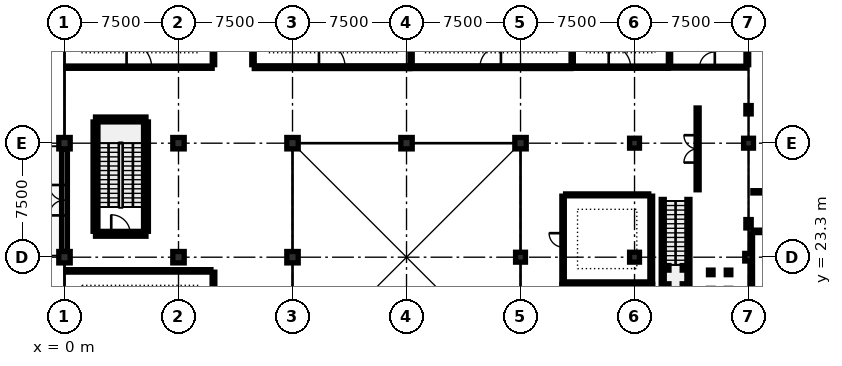
"""IFC4 building model, lengths in metres.
Left out: names, types, materials, properties, quantities, classifications, styles, units other than length and angle.
Written with IfcOpenShell. Run it as: python <this file> out.ifc"""

import sys

from ifc_helpers import new_model, si_unit, direction, frame, frame_2d, origin, origin_2d, place, context, subcontext, project, spatial, rectangle, i_section, extrude, element, fill, save


model = new_model("IFC4")
c1 = context("Model", 3, precision=1e-05, world=origin(), true_north=direction((0.0, 1.0)))
c2 = subcontext(c1, "Body", "Model", "MODEL_VIEW")
j1 = project(units=[si_unit("LENGTHUNIT", "METRE"), si_unit("PLANEANGLEUNIT", "RADIAN")], contexts=[c1])
p1 = place(None, origin())
s1 = spatial("IfcSite", under=j1, at=p1, CompositionType="ELEMENT")
p2 = place(p1, origin())
s2 = spatial("IfcBuilding", under=s1, at=p2, CompositionType="ELEMENT")
p3 = place(p2, origin())
s3 = spatial("IfcBuildingStorey", under=s2, at=p3, CompositionType="ELEMENT", Elevation=0.0)
for number, where, z_axis, x_axis in (
    (1, (0.0, 23.3, 0.0), (0.0, 0.0, 1.0), (1.0, 0.0, 0.0)),
    (2, (0.0, 30.8, 0.0), (0.0, 0.0, 1.0), (1.0, 0.0, 0.0)),
    (3, (7.5, 23.3, 0.0), (0.0, 0.0, 1.0), (1.0, 0.0, 0.0)),
    (4, (7.5, 30.8, 0.0), (0.0, 0.0, 1.0), (1.0, 0.0, 0.0)),
    (5, (15.0, 23.3, 0.0), (0.0, 0.0, 1.0), (1.0, 0.0, 0.0)),
    (6, (15.0, 30.8, 0.0), (0.0, 0.0, 1.0), (1.0, 0.0, 0.0)),
    (7, (22.5, 30.8, 0.0), (0.0, 0.0, 1.0), (1.0, 0.0, 0.0)),
):
    element("IfcColumn", number, at=place(p3, frame(where, z_axis=z_axis, x_axis=x_axis)), inside=s3, PredefinedType="COLUMN", context=c2, shape_type="SweptSolid", body=[
        extrude(rectangle(XDim=0.75, YDim=0.75, at=origin_2d()), origin(), (0.0, 0.0, 1.0), 4.7),
    ])
p4 = place(p3, frame((30.0, 23.3, 0.0), z_axis=(0.0, 0.0, 1.0), x_axis=(1.0, 0.0, 0.0)))
e8 = element("IfcColumn", 8, at=p4, inside=s3, PredefinedType="COLUMN", context=c2, shape_type="SweptSolid", body=[
    extrude(rectangle(XDim=0.65, YDim=0.65, at=origin_2d()), origin(), (0.0, 0.0, 1.0), 4.7),
])
p5 = place(p3, frame((30.0, 30.8, 0.0), z_axis=(0.0, 0.0, 1.0), x_axis=(1.0, 0.0, 0.0)))
e9 = element("IfcColumn", 9, at=p5, inside=s3, PredefinedType="COLUMN", context=c2, shape_type="SweptSolid", body=[
    extrude(rectangle(XDim=0.75, YDim=0.75, at=origin_2d()), origin(), (0.0, 0.0, 1.0), 4.7),
])
for number, where, z_axis, x_axis in (
    (10, (37.5, 23.3, 0.0), (0.0, 0.0, 1.0), (1.0, 0.0, 0.0)),
    (11, (37.5, 30.8, 0.0), (0.0, 0.0, 1.0), (1.0, 0.0, 0.0)),
):
    element("IfcColumn", number, at=place(p3, frame(where, z_axis=z_axis, x_axis=x_axis)), inside=s3, PredefinedType="COLUMN", context=c2, shape_type="SweptSolid", body=[
        extrude(rectangle(XDim=0.65, YDim=0.65, at=origin_2d()), origin(), (0.0, 0.0, 1.0), 4.7),
    ])
p6 = place(p3, frame((45.0, 23.3, 0.0), z_axis=(0.0, 0.0, 1.0), x_axis=(1.0, 0.0, 0.0)))
e12 = element("IfcColumn", 12, at=p6, inside=s3, PredefinedType="COLUMN", context=c2, shape_type="SweptSolid", body=[
    extrude(rectangle(XDim=0.5, YDim=0.5, at=origin_2d()), origin(), (0.0, 0.0, 1.0), 6.138),
])
p7 = place(p3, frame((45.0, 30.8, 0.0), z_axis=(0.0, 0.0, 1.0), x_axis=(1.0, 0.0, 0.0)))
e13 = element("IfcColumn", 13, at=p7, inside=s3, PredefinedType="COLUMN", context=c2, shape_type="SweptSolid", body=[
    extrude(rectangle(XDim=0.65, YDim=0.65, at=origin_2d()), origin(), (0.0, 0.0, 1.0), 4.7),
])
for number, where, z_axis, x_axis in (
    (14, (45.0, 25.5, 0.0), (0.0, 0.0, 1.0), (1.0, 0.0, 0.0)),
    (15, (45.0, 33.0, 0.0), (0.0, 0.0, 1.0), (1.0, 0.0, 0.0)),
):
    element("IfcColumn", number, at=place(p3, frame(where, z_axis=z_axis, x_axis=x_axis)), inside=s3, PredefinedType="PILASTER", context=c2, shape_type="SweptSolid", body=[
        extrude(rectangle(XDim=0.35, YDim=0.55, at=origin_2d()), origin(), (0.0, 0.0, 1.0), 4.7),
    ])
p8 = place(p3, frame((0.0, 23.675, 0.0), z_axis=(0.0, 0.0, 1.0), x_axis=(0.0, 1.0, 0.0)))
e16 = element("IfcWall", 16, at=p8, inside=s3, PredefinedType="SOLIDWALL", context=c2, shape_type="SweptSolid", body=[
    extrude(rectangle(XDim=6.75, YDim=0.38, at=frame_2d((3.375, 0.0))), origin(), (0.0, 0.0, 1.0), 4.035),
])
p9 = place(p8, frame((2.375, 0.0, 0.0)))
e17 = element("IfcOpeningElement", 17, at=p9, cuts=e16, PredefinedType="OPENING", context=c2, shape_type="SweptSolid", body=[
    extrude(rectangle(XDim=2.0, YDim=2.35, at=frame_2d((1.0, 1.175))), frame((0.0, 0.202, 0.0), z_axis=(0.0, -1.0, 0.0), x_axis=(1.0, 0.0, 0.0)), (0.0, 0.0, 1.0), 0.404),
])
p10 = place(p3, frame((5.36, 25.005, 0.0), z_axis=(0.0, 0.0, 1.0), x_axis=(0.0, 1.0, 0.0)))
e18 = element("IfcWall", 18, at=p10, inside=s3, PredefinedType="SHEAR", context=c2, shape_type="SweptSolid", body=[
    extrude(rectangle(XDim=7.19, YDim=0.32, at=frame_2d((3.595, 0.0))), origin(), (0.0, 0.0, 1.0), 4.7),
])
p11 = place(p3, frame((5.36, 32.36, 0.0), z_axis=(0.0, 0.0, 1.0), x_axis=(-1.0, 0.0, 0.0)))
e19 = element("IfcWall", 19, at=p11, inside=s3, PredefinedType="SHEAR", context=c2, shape_type="SweptSolid", body=[
    extrude(rectangle(XDim=3.32, YDim=0.32, at=frame_2d((1.66, 0.0))), origin(), (0.0, 0.0, 1.0), 4.7),
])
p12 = place(p3, frame((2.04, 32.195, 0.0), z_axis=(0.0, 0.0, 1.0), x_axis=(0.0, -1.0, 0.0)))
e20 = element("IfcWall", 20, at=p12, inside=s3, PredefinedType="SHEAR", context=c2, shape_type="SweptSolid", body=[
    extrude(rectangle(XDim=7.19, YDim=0.32, at=frame_2d((3.595, 0.0))), origin(), (0.0, 0.0, 1.0), 4.7),
])
p13 = place(p3, frame((2.04, 24.84, 0.0), z_axis=(0.0, 0.0, 1.0), x_axis=(1.0, 0.0, 0.0)))
e21 = element("IfcWall", 21, at=p13, inside=s3, PredefinedType="SHEAR", context=c2, shape_type="SweptSolid", body=[
    extrude(rectangle(XDim=3.32, YDim=0.32, at=frame_2d((1.66, 0.0))), origin(), (0.0, 0.0, 1.0), 4.7),
])
p14 = place(p13, frame((1.035, 0.0, 0.0)))
e22 = element("IfcOpeningElement", 22, at=p14, cuts=e21, PredefinedType="OPENING", context=c2, shape_type="SweptSolid", body=[
    extrude(rectangle(XDim=1.25, YDim=2.2, at=frame_2d((0.625, 1.1))), frame((0.0, 0.172, 0.0), z_axis=(0.0, -1.0, 0.0), x_axis=(1.0, 0.0, 0.0)), (0.0, 0.0, 1.0), 0.344),
])
for number, where, z_axis, x_axis in (
    (23, (39.355, 16.9, 0.0), (0.0, 0.0, 1.0), (0.0, 1.0, 0.0)),
    (24, (41.045, 16.9, 0.0), (0.0, 0.0, 1.0), (0.0, 1.0, 0.0)),
):
    element("IfcWall", number, at=place(p3, frame(where, z_axis=z_axis, x_axis=x_axis)), inside=s3, PredefinedType="PARTITIONING", context=c2, shape_type="SweptSolid", body=[
        extrude(rectangle(XDim=10.2, YDim=0.2, at=frame_2d((5.1, 0.0))), origin(), (0.0, 0.0, 1.0), 2.3),
    ])
for number, where, z_axis, x_axis in (
    (25, (39.615, 21.4, 0.0), (0.0, 0.0, 1.0), (1.0, 0.0, 0.0)),
    (26, (40.785, 21.4, 0.0), (0.0, 0.0, 1.0), (1.0, 0.0, 0.0)),
    (27, (40.785, 22.6, 0.0), (0.0, 0.0, 1.0), (1.0, 0.0, 0.0)),
    (28, (39.615, 22.6, 0.0), (0.0, 0.0, 1.0), (1.0, 0.0, 0.0)),
):
    element("IfcColumn", number, at=place(p3, frame(where, z_axis=z_axis, x_axis=x_axis)), inside=s3, PredefinedType="COLUMN", context=c2, shape_type="SweptSolid", body=[
        extrude(i_section(OverallWidth=0.3, OverallDepth=0.3, WebThickness=0.011, FlangeThickness=0.019, FilletRadius=0.027, at=origin_2d()), origin(), (0.0, 0.0, 1.0), 2.3),
    ])
for number, where, z_axis, x_axis in (
    (29, (43.685, 22.3, 0.0), (0.0, 0.0, 1.0), (1.0, 0.0, 0.0)),
    (30, (42.515, 22.3, 0.0), (0.0, 0.0, 1.0), (1.0, 0.0, 0.0)),
):
    element("IfcColumn", number, at=place(p3, frame(where, z_axis=z_axis, x_axis=x_axis)), inside=s3, PredefinedType="COLUMN", context=c2, shape_type="SweptSolid", body=[
        extrude(i_section(OverallWidth=0.3, OverallDepth=0.3, WebThickness=0.011, FlangeThickness=0.019, FilletRadius=0.027, at=origin_2d()), origin(), (0.0, 0.0, 1.0), 4.7),
    ])
p15 = place(p3, frame((0.102, 35.8, 0.0), z_axis=(0.0, 0.0, 1.0), x_axis=(1.0, 0.0, 0.0)))
e31 = element("IfcWall", 31, at=p15, inside=s3, PredefinedType="PARTITIONING", context=c2, shape_type="SweptSolid", body=[
    extrude(rectangle(XDim=9.613, YDim=0.15, at=frame_2d((4.807, 0.0))), origin(), (0.0, 0.0, 1.0), 3.765),
])
p16 = place(p15, frame((3.981, 0.0, 0.0)))
e32 = element("IfcOpeningElement", 32, at=p16, cuts=e31, PredefinedType="OPENING", context=c2, shape_type="SweptSolid", body=[
    extrude(rectangle(XDim=1.65, YDim=2.32, at=frame_2d((0.825, 1.16))), frame((0.0, 0.087, 0.0), z_axis=(0.0, -1.0, 0.0), x_axis=(1.0, 0.0, 0.0)), (0.0, 0.0, 1.0), 0.174),
])
p17 = place(p3, frame((12.485, 35.8, 0.0), z_axis=(0.0, 0.0, 1.0), x_axis=(1.0, 0.0, 0.0)))
e33 = element("IfcWall", 33, at=p17, inside=s3, PredefinedType="PARTITIONING", context=c2, shape_type="SweptSolid", body=[
    extrude(rectangle(XDim=10.23, YDim=0.18, at=frame_2d((5.115, 0.0))), origin(), (0.0, 0.0, 1.0), 3.765),
])
p18 = place(p17, frame((4.255, 0.0, 0.0)))
e34 = element("IfcOpeningElement", 34, at=p18, cuts=e33, PredefinedType="OPENING", context=c2, shape_type="SweptSolid", body=[
    extrude(rectangle(XDim=1.72, YDim=2.34, at=frame_2d((0.86, 1.17))), frame((0.0, 0.102, 0.0), z_axis=(0.0, -1.0, 0.0), x_axis=(1.0, 0.0, 0.0)), (0.0, 0.0, 1.0), 0.204),
])
p19 = place(p3, frame((22.727, 35.8, 0.0), z_axis=(0.0, 0.0, 1.0), x_axis=(1.0, 0.0, 0.0)))
e35 = element("IfcWall", 35, at=p19, inside=s3, PredefinedType="PARTITIONING", context=c2, shape_type="SweptSolid", body=[
    extrude(rectangle(XDim=10.588, YDim=0.18, at=frame_2d((5.294, 0.0))), origin(), (0.0, 0.0, 1.0), 3.765),
])
p20 = place(p19, frame((4.604, 0.0, 0.0)))
e36 = element("IfcOpeningElement", 36, at=p20, cuts=e35, PredefinedType="OPENING", context=c2, shape_type="SweptSolid", body=[
    extrude(rectangle(XDim=1.38, YDim=2.3, at=frame_2d((0.69, 1.15))), frame((0.0, 0.102, 0.0), z_axis=(0.0, -1.0, 0.0), x_axis=(1.0, 0.0, 0.0)), (0.0, 0.0, 1.0), 0.204),
])
p21 = place(p3, frame((33.327, 35.8, 0.0), z_axis=(0.0, 0.0, 1.0), x_axis=(1.0, 0.0, 0.0)))
e37 = element("IfcWall", 37, at=p21, inside=s3, PredefinedType="PARTITIONING", context=c2, shape_type="SweptSolid", body=[
    extrude(rectangle(XDim=6.388, YDim=0.15, at=frame_2d((3.194, 0.0))), origin(), (0.0, 0.0, 1.0), 3.985),
])
p22 = place(p21, frame((2.474, 0.0, 0.0)))
e38 = element("IfcOpeningElement", 38, at=p22, cuts=e37, PredefinedType="OPENING", context=c2, shape_type="SweptSolid", body=[
    extrude(rectangle(XDim=1.44, YDim=2.32, at=frame_2d((0.72, 1.16))), frame((0.0, 0.087, 0.0), z_axis=(0.0, -1.0, 0.0), x_axis=(1.0, 0.0, 0.0)), (0.0, 0.0, 1.0), 0.174),
])
p23 = place(p3, frame((39.727, 35.8, 0.0), z_axis=(0.0, 0.0, 1.0), x_axis=(1.0, 0.0, 0.0)))
e39 = element("IfcWall", 39, at=p23, inside=s3, PredefinedType="PARTITIONING", context=c2, shape_type="SweptSolid", body=[
    extrude(rectangle(XDim=5.108, YDim=0.125, at=frame_2d((2.554, 0.0))), origin(), (0.0, 0.0, 1.0), 4.035),
])
p24 = place(p23, frame((2.054, 0.0, 0.0)))
e40 = element("IfcOpeningElement", 40, at=p24, cuts=e39, PredefinedType="OPENING", context=c2, shape_type="SweptSolid", body=[
    extrude(rectangle(XDim=1.0, YDim=2.15, at=frame_2d((0.5, 1.075))), frame((0.0, 0.074, 0.0), z_axis=(0.0, -1.0, 0.0), x_axis=(1.0, 0.0, 0.0)), (0.0, 0.0, 1.0), 0.149),
])
p25 = place(p3, frame((9.8, 15.127, 0.0), z_axis=(0.0, 0.0, 1.0), x_axis=(0.0, 1.0, 0.0)))
e41 = element("IfcWall", 41, at=p25, inside=s3, PredefinedType="PARTITIONING", context=c2, shape_type="SweptSolid", body=[
    extrude(rectangle(XDim=7.188, YDim=0.18, at=frame_2d((3.594, 0.0))), origin(), (0.0, 0.0, 1.0), 3.765),
])
p26 = place(p25, frame((2.994, 0.0, 0.0)))
e42 = element("IfcOpeningElement", 42, at=p26, cuts=e41, PredefinedType="OPENING", context=c2, shape_type="SweptSolid", body=[
    extrude(rectangle(XDim=1.2, YDim=2.15, at=frame_2d((0.6, 1.075))), frame((0.0, 0.102, 0.0), z_axis=(0.0, -1.0, 0.0), x_axis=(1.0, 0.0, 0.0)), (0.0, 0.0, 1.0), 0.204),
])
p27 = place(p3, frame((41.65, 27.735, 0.0), z_axis=(0.0, 0.0, 1.0), x_axis=(0.0, 1.0, 0.0)))
e43 = element("IfcWall", 43, at=p27, inside=s3, PredefinedType="PARTITIONING", context=c2, shape_type="SweptSolid", body=[
    extrude(rectangle(XDim=5.38, YDim=0.2, at=frame_2d((2.69, 0.0))), origin(), (0.0, 0.0, 1.0), 3.985),
])
p28 = place(p27, frame((1.79, 0.0, 0.0)))
e44 = element("IfcOpeningElement", 44, at=p28, cuts=e43, PredefinedType="OPENING", context=c2, shape_type="SweptSolid", body=[
    extrude(rectangle(XDim=1.8, YDim=2.15, at=frame_2d((0.9, 1.075))), frame((0.0, 0.112, 0.0), z_axis=(0.0, -1.0, 0.0), x_axis=(1.0, 0.0, 0.0)), (0.0, 0.0, 1.0), 0.224),
])
p29 = place(p3, frame((32.8, 15.885, 0.0), z_axis=(0.0, 0.0, 1.0), x_axis=(0.0, 1.0, 0.0)))
e45 = element("IfcWall", 45, at=p29, inside=s3, PredefinedType="PARTITIONING", context=c2, shape_type="SweptSolid", body=[
    extrude(rectangle(XDim=5.63, YDim=0.15, at=frame_2d((2.815, 0.0))), origin(), (0.0, 0.0, 1.0), 3.985),
])
p30 = place(p29, frame((2.34, 0.0, 0.0)))
e46 = element("IfcOpeningElement", 46, at=p30, cuts=e45, PredefinedType="OPENING", context=c2, shape_type="SweptSolid", body=[
    extrude(rectangle(XDim=0.95, YDim=2.15, at=frame_2d((0.475, 1.075))), frame((0.0, 0.087, 0.0), z_axis=(0.0, -1.0, 0.0), x_axis=(1.0, 0.0, 0.0)), (0.0, 0.0, 1.0), 0.174),
])
p31 = place(p3, frame((32.8, 21.527, 0.0), z_axis=(0.0, 0.0, 1.0), x_axis=(0.0, 1.0, 0.0)))
e47 = element("IfcWall", 47, at=p31, inside=s3, PredefinedType="PARTITIONING", context=c2, shape_type="SweptSolid", body=[
    extrude(rectangle(XDim=5.788, YDim=0.16, at=frame_2d((2.894, 0.0))), origin(), (0.0, 0.0, 1.0), 3.985),
])
p32 = place(p31, frame((2.434, 0.0, 0.0)))
e48 = element("IfcOpeningElement", 48, at=p32, cuts=e47, PredefinedType="OPENING", context=c2, shape_type="SweptSolid", body=[
    extrude(rectangle(XDim=0.92, YDim=2.1, at=frame_2d((0.46, 1.05))), frame((0.0, 0.092, 0.0), z_axis=(0.0, -1.0, 0.0), x_axis=(1.0, 0.0, 0.0)), (0.0, 0.0, 1.0), 0.184),
])
p33 = place(p3, frame((45.285, 25.0, 0.0), z_axis=(0.0, 0.0, 1.0), x_axis=(1.0, 0.0, 0.0)))
e49 = element("IfcWall", 49, at=p33, inside=s3, PredefinedType="PARTITIONING", context=c2, shape_type="SweptSolid", body=[
    extrude(rectangle(XDim=7.13, YDim=0.16, at=frame_2d((3.565, 0.0))), origin(), (0.0, 0.0, 1.0), 4.321),
])
p34 = place(p33, frame((3.025, 0.0, 0.0)))
e50 = element("IfcOpeningElement", 50, at=p34, cuts=e49, PredefinedType="OPENING", context=c2, shape_type="SweptSolid", body=[
    extrude(rectangle(XDim=1.08, YDim=2.18, at=frame_2d((0.54, 1.09))), frame((0.0, 0.092, 0.0), z_axis=(0.0, -1.0, 0.0), x_axis=(1.0, 0.0, 0.0)), (0.0, 0.0, 1.0), 0.184),
])
p35 = place(p3, frame((45.285, 27.6, 0.0), z_axis=(0.0, 0.0, 1.0), x_axis=(1.0, 0.0, 0.0)))
e51 = element("IfcWall", 51, at=p35, inside=s3, PredefinedType="PARTITIONING", context=c2, shape_type="SweptSolid", body=[
    extrude(rectangle(XDim=5.03, YDim=0.15, at=frame_2d((2.515, 0.0))), origin(), (0.0, 0.0, 1.0), 4.7),
])
p36 = place(p35, frame((1.895, 0.0, 0.0)))
e52 = element("IfcOpeningElement", 52, at=p36, cuts=e51, PredefinedType="OPENING", context=c2, shape_type="SweptSolid", body=[
    extrude(rectangle(XDim=1.24, YDim=2.2, at=frame_2d((0.62, 1.1))), frame((0.0, 0.087, 0.0), z_axis=(0.0, -1.0, 0.0), x_axis=(1.0, 0.0, 0.0)), (0.0, 0.0, 1.0), 0.174),
])
p37 = place(p3, frame((38.6, 15.885, 0.0), z_axis=(0.0, 0.0, 1.0), x_axis=(0.0, 1.0, 0.0)))
e53 = element("IfcWall", 53, at=p37, inside=s3, PredefinedType="PARTITIONING", context=c2, shape_type="SweptSolid", body=[
    extrude(rectangle(XDim=5.63, YDim=0.18, at=frame_2d((2.815, 0.0))), origin(), (0.0, 0.0, 1.0), 4.7),
])
p38 = place(p3, frame((38.6, 21.527, 0.0), z_axis=(0.0, 0.0, 1.0), x_axis=(0.0, 1.0, 0.0)))
e54 = element("IfcWall", 54, at=p38, inside=s3, PredefinedType="PARTITIONING", context=c2, shape_type="SweptSolid", body=[
    extrude(rectangle(XDim=5.788, YDim=0.18, at=frame_2d((2.894, 0.0))), origin(), (0.0, 0.0, 1.0), 4.7),
])
p39 = place(p3, frame((9.8, 35.965, 0.0), z_axis=(0.0, 0.0, 1.0), x_axis=(0.0, 1.0, 0.0)))
e55 = element("IfcWall", 55, at=p39, inside=s3, PredefinedType="PARTITIONING", context=c2, shape_type="SweptSolid", body=[
    extrude(rectangle(XDim=9.908, YDim=0.16, at=frame_2d((4.954, 0.0))), origin(), (0.0, 0.0, 1.0), 3.765),
])
p40 = place(p3, frame((12.4, 35.965, 0.0), z_axis=(0.0, 0.0, 1.0), x_axis=(0.0, 1.0, 0.0)))
e56 = element("IfcWall", 56, at=p40, inside=s3, PredefinedType="PARTITIONING", context=c2, shape_type="SweptSolid", body=[
    extrude(rectangle(XDim=9.59, YDim=0.16, at=frame_2d((4.795, 0.0))), origin(), (0.0, 0.0, 1.0), 3.765),
])
p41 = place(p3, frame((22.8, 35.902, 0.0), z_axis=(0.0, 0.0, 1.0), x_axis=(0.0, 1.0, 0.0)))
e57 = element("IfcWall", 57, at=p41, inside=s3, PredefinedType="PARTITIONING", context=c2, shape_type="SweptSolid", body=[
    extrude(rectangle(XDim=9.536, YDim=0.15, at=frame_2d((4.768, 0.0))), origin(), (0.0, 0.0, 1.0), 3.765),
])
p42 = place(p3, frame((33.4, 35.887, 0.0), z_axis=(0.0, 0.0, 1.0), x_axis=(0.0, 1.0, 0.0)))
e58 = element("IfcWall", 58, at=p42, inside=s3, PredefinedType="PARTITIONING", context=c2, shape_type="SweptSolid", body=[
    extrude(rectangle(XDim=9.731, YDim=0.15, at=frame_2d((4.865, 0.0))), origin(), (0.0, 0.0, 1.0), 3.985),
])
p43 = place(p3, frame((39.8, 35.875, 0.0), z_axis=(0.0, 0.0, 1.0), x_axis=(0.0, 1.0, 0.0)))
e59 = element("IfcWall", 59, at=p43, inside=s3, PredefinedType="PARTITIONING", context=c2, shape_type="SweptSolid", body=[
    extrude(rectangle(XDim=9.753, YDim=0.15, at=frame_2d((4.877, 0.0))), origin(), (0.0, 0.0, 1.0), 3.985),
])
p44 = place(p3, frame((44.92, 35.965, 0.0), z_axis=(0.0, 0.0, 1.0), x_axis=(0.0, 1.0, 0.0)))
e60 = element("IfcWall", 60, at=p44, inside=s3, PredefinedType="PARTITIONING", context=c2, shape_type="SweptSolid", body=[
    extrude(rectangle(XDim=9.498, YDim=0.18, at=frame_2d((4.749, 0.0))), origin(), (0.0, 0.0, 1.0), 3.985),
])
p45 = place(p3, frame((0.102, 22.4, 0.0), z_axis=(0.0, 0.0, 1.0), x_axis=(1.0, 0.0, 0.0)))
e61 = element("IfcWall", 61, at=p45, inside=s3, PredefinedType="PARTITIONING", context=c2, shape_type="SweptSolid", body=[
    extrude(rectangle(XDim=9.533, YDim=0.16, at=frame_2d((4.767, 0.0))), origin(), (0.0, 0.0, 1.0), 3.765),
])
p46 = place(p3, frame((32.892, 21.6, 0.0), z_axis=(0.0, 0.0, 1.0), x_axis=(1.0, 0.0, 0.0)))
e62 = element("IfcWall", 62, at=p46, inside=s3, PredefinedType="PARTITIONING", context=c2, shape_type="SweptSolid", body=[
    extrude(rectangle(XDim=5.606, YDim=0.15, at=frame_2d((2.803, 0.0))), origin(), (0.0, 0.0, 1.0), 3.985),
])
p47 = place(p3, frame((32.965, 27.4, 0.0), z_axis=(0.0, 0.0, 1.0), x_axis=(1.0, 0.0, 0.0)))
e63 = element("IfcWall", 63, at=p47, inside=s3, PredefinedType="PARTITIONING", context=c2, shape_type="SweptSolid", body=[
    extrude(rectangle(XDim=5.47, YDim=0.125, at=frame_2d((2.735, 0.0))), origin(), (0.0, 0.0, 1.0), 3.985),
])
p48 = place(p3, frame((45.2, 8.637, 0.0), z_axis=(0.0, 0.0, 1.0), x_axis=(0.0, 1.0, 0.0)))
e64 = element("IfcWall", 64, at=p48, inside=s3, PredefinedType="PARTITIONING", context=c2, shape_type="SweptSolid", body=[
    extrude(rectangle(XDim=16.198, YDim=0.125, at=frame_2d((8.099, 0.0))), origin(), (0.0, 0.0, 1.0), 3.985),
])
p49 = place(p9, origin())
e65 = element("IfcDoor", 65, at=p49, inside=s3, OperationType="DOUBLE_DOOR_SINGLE_SWING", PredefinedType="DOOR", context=c2, shape_type="SweptSolid", body=[
    extrude(rectangle(XDim=2.0, YDim=2.35, at=frame_2d((1.0, 1.175))), frame((0.0, 0.025, 0.0), z_axis=(0.0, -1.0, 0.0), x_axis=(1.0, 0.0, 0.0)), (0.0, 0.0, 1.0), 0.05),
])
fill(e17, e65)
p50 = place(p14, origin())
e66 = element("IfcDoor", 66, at=p50, inside=s3, OperationType="SINGLE_SWING_LEFT", PredefinedType="DOOR", context=c2, shape_type="SweptSolid", body=[
    extrude(rectangle(XDim=1.25, YDim=2.2, at=frame_2d((0.625, 1.1))), frame((0.0, 0.025, 0.0), z_axis=(0.0, -1.0, 0.0), x_axis=(1.0, 0.0, 0.0)), (0.0, 0.0, 1.0), 0.05),
])
fill(e22, e66)
p51 = place(p16, origin())
e67 = element("IfcDoor", 67, at=p51, inside=s3, OperationType="SINGLE_SWING_LEFT", PredefinedType="DOOR", context=c2, shape_type="SweptSolid", body=[
    extrude(rectangle(XDim=1.65, YDim=2.32, at=frame_2d((0.825, 1.16))), frame((0.0, 0.025, 0.0), z_axis=(0.0, -1.0, 0.0), x_axis=(1.0, 0.0, 0.0)), (0.0, 0.0, 1.0), 0.05),
])
fill(e32, e67)
p52 = place(p18, origin())
e68 = element("IfcDoor", 68, at=p52, inside=s3, OperationType="SINGLE_SWING_LEFT", PredefinedType="DOOR", context=c2, shape_type="SweptSolid", body=[
    extrude(rectangle(XDim=1.72, YDim=2.34, at=frame_2d((0.86, 1.17))), frame((0.0, 0.025, 0.0), z_axis=(0.0, -1.0, 0.0), x_axis=(1.0, 0.0, 0.0)), (0.0, 0.0, 1.0), 0.05),
])
fill(e34, e68)
p53 = place(p20, origin())
e69 = element("IfcDoor", 69, at=p53, inside=s3, OperationType="SINGLE_SWING_RIGHT", PredefinedType="DOOR", context=c2, shape_type="SweptSolid", body=[
    extrude(rectangle(XDim=1.38, YDim=2.3, at=frame_2d((0.69, 1.15))), frame((0.0, 0.025, 0.0), z_axis=(0.0, -1.0, 0.0), x_axis=(1.0, 0.0, 0.0)), (0.0, 0.0, 1.0), 0.05),
])
fill(e36, e69)
p54 = place(p22, origin())
e70 = element("IfcDoor", 70, at=p54, inside=s3, OperationType="SINGLE_SWING_LEFT", PredefinedType="DOOR", context=c2, shape_type="SweptSolid", body=[
    extrude(rectangle(XDim=1.44, YDim=2.32, at=frame_2d((0.72, 1.16))), frame((0.0, 0.025, 0.0), z_axis=(0.0, -1.0, 0.0), x_axis=(1.0, 0.0, 0.0)), (0.0, 0.0, 1.0), 0.05),
])
fill(e38, e70)
p55 = place(p24, origin())
e71 = element("IfcDoor", 71, at=p55, inside=s3, OperationType="SINGLE_SWING_RIGHT", PredefinedType="DOOR", context=c2, shape_type="SweptSolid", body=[
    extrude(rectangle(XDim=1.0, YDim=2.15, at=frame_2d((0.5, 1.075))), frame((0.0, 0.025, 0.0), z_axis=(0.0, -1.0, 0.0), x_axis=(1.0, 0.0, 0.0)), (0.0, 0.0, 1.0), 0.05),
])
fill(e40, e71)
p56 = place(p28, origin())
e72 = element("IfcDoor", 72, at=p56, inside=s3, OperationType="DOUBLE_DOOR_SINGLE_SWING", PredefinedType="DOOR", context=c2, shape_type="SweptSolid", body=[
    extrude(rectangle(XDim=1.8, YDim=2.15, at=frame_2d((0.9, 1.075))), frame((0.0, 0.025, 0.0), z_axis=(0.0, -1.0, 0.0), x_axis=(1.0, 0.0, 0.0)), (0.0, 0.0, 1.0), 0.05),
])
fill(e44, e72)
p57 = place(p32, origin())
e73 = element("IfcDoor", 73, at=p57, inside=s3, OperationType="SINGLE_SWING_RIGHT", PredefinedType="DOOR", context=c2, shape_type="SweptSolid", body=[
    extrude(rectangle(XDim=0.92, YDim=2.1, at=frame_2d((0.46, 1.05))), frame((0.0, 0.025, 0.0), z_axis=(0.0, -1.0, 0.0), x_axis=(1.0, 0.0, 0.0)), (0.0, 0.0, 1.0), 0.05),
])
fill(e48, e73)
save(model, sys.argv[1])
